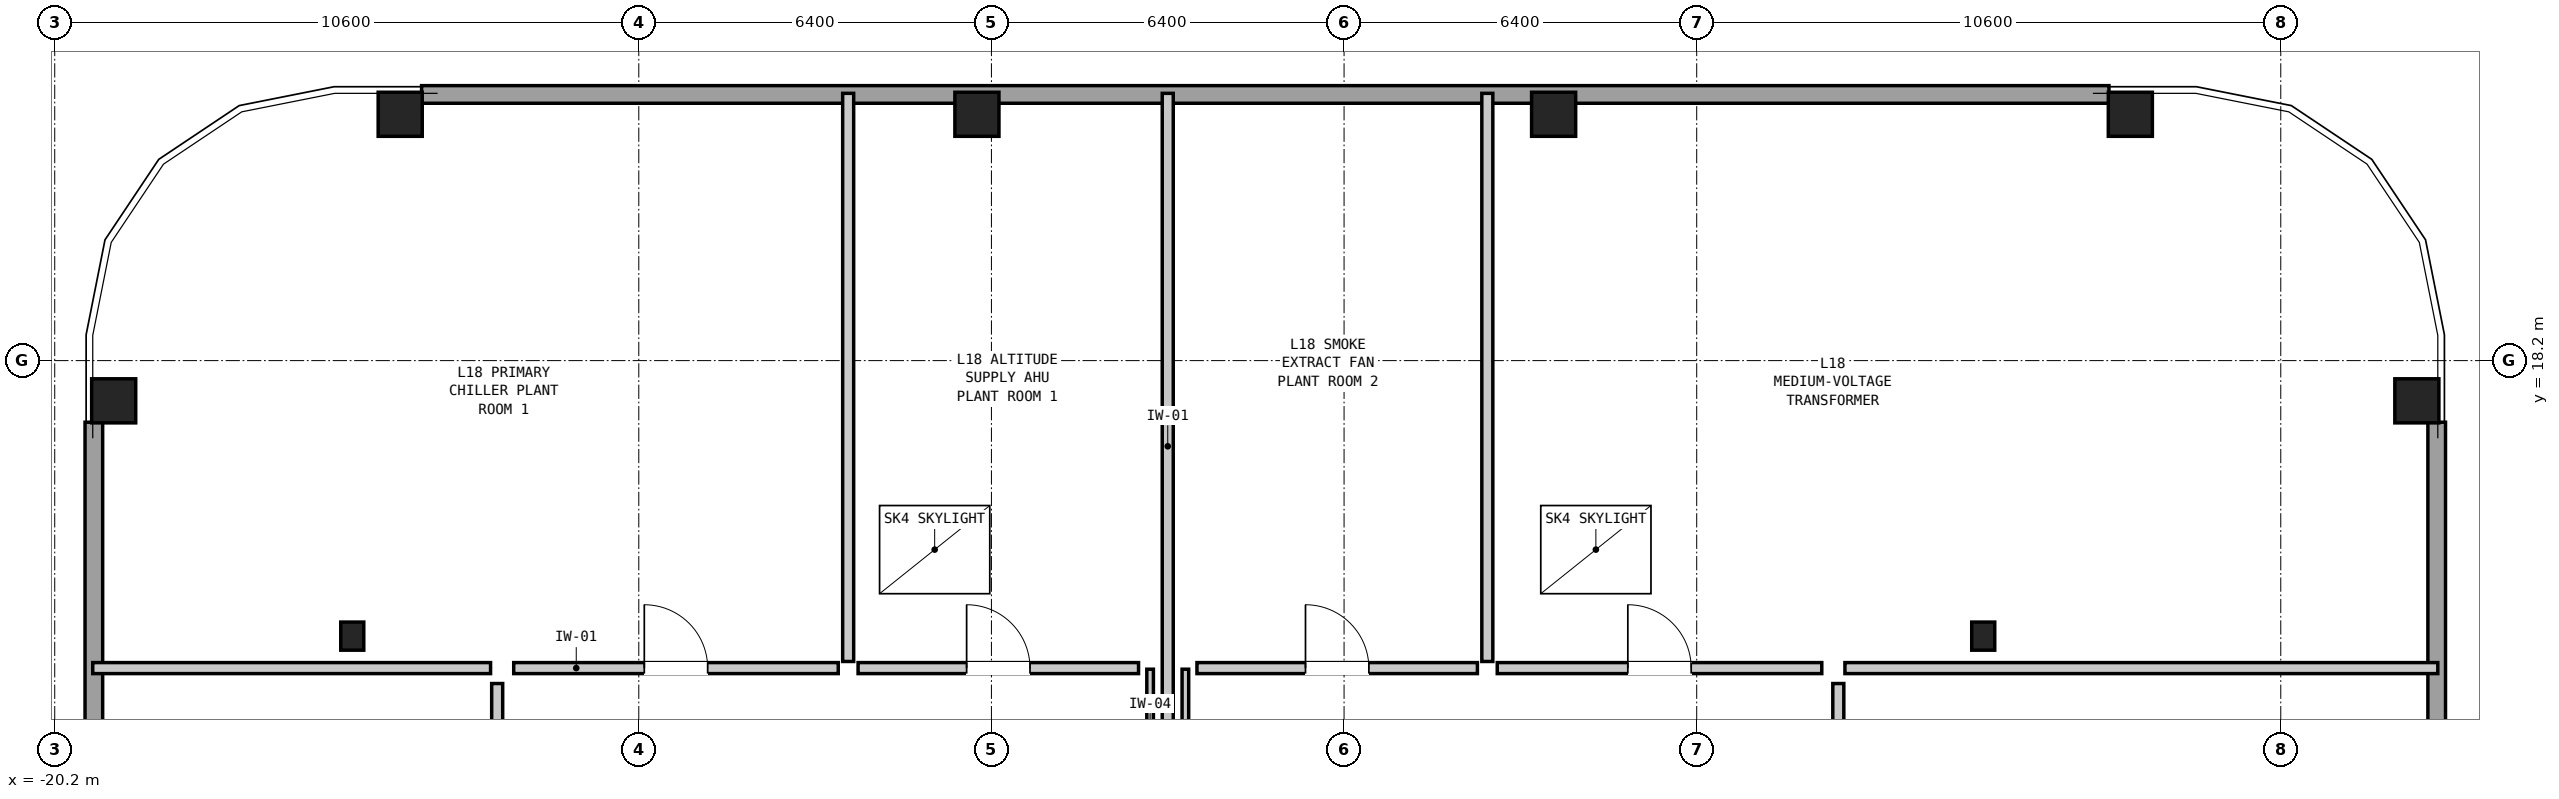
"""IFC4 building model, lengths in metres.
Left out: names, types, materials, properties, quantities, classifications, styles, units other than length and angle.
Written with IfcOpenShell. Run it as: python <this file> out.ifc"""

import sys

from ifc_helpers import new_model, si_unit, direction, frame, frame_2d, origin, origin_2d, place, context, subcontext, project, spatial, rectangle, hollow_rectangle, i_section, extrude, element, fill, save


model = new_model("IFC4")
c1 = context("Model", 3, precision=1e-05, world=origin(), true_north=direction((0.0, 1.0)))
c2 = subcontext(c1, "Body", "Model", "MODEL_VIEW")
j1 = project(units=[si_unit("LENGTHUNIT", "METRE"), si_unit("PLANEANGLEUNIT", "RADIAN")], contexts=[c1])
p1 = place(None, origin())
s1 = spatial("IfcSite", under=j1, at=p1, CompositionType="ELEMENT")
p2 = place(p1, origin())
s2 = spatial("IfcBuilding", under=s1, at=p2, CompositionType="ELEMENT")
p3 = place(p2, frame((0.0, 0.0, 65.1)))
s3 = spatial("IfcBuildingStorey", under=s2, at=p3, CompositionType="ELEMENT", Elevation=65.1)
for number, where, z_axis, x_axis in (
    (1, (22.67, 17.47, 0.0), (0.0, 0.0, 1.0), (0.0, 1.0, 0.0)),
    (2, (17.47, 22.67, 0.0), (0.0, 0.0, 1.0), (1.0, 0.0, 0.0)),
    (3, (7.003, 22.67, 0.0), (0.0, 0.0, 1.0), (1.0, 0.0, 0.0)),
    (4, (-3.463, 22.67, 0.0), (0.0, 0.0, 1.0), (1.0, 0.0, 0.0)),
    (5, (-13.93, 22.67, 0.0), (0.0, 0.0, 1.0), (1.0, 0.0, 0.0)),
    (6, (-19.13, 17.47, 0.0), (0.0, 0.0, 1.0), (0.0, 1.0, 0.0)),
):
    element("IfcColumn", number, at=place(p3, frame(where, z_axis=z_axis, x_axis=x_axis)), inside=s3, PredefinedType="COLUMN", context=c2, shape_type="SweptSolid", body=[
        extrude(hollow_rectangle(XDim=0.8, YDim=0.8, WallThickness=0.05, at=origin_2d()), origin(), (0.0, 0.0, 1.0), 4.35),
    ])
for number, where, z_axis, x_axis in (
    (7, (-14.8, 13.2, 0.0), (0.0, 0.0, 1.0), (1.0, 0.0, 0.0)),
    (8, (14.8, 13.2, 0.0), (0.0, 0.0, 1.0), (1.0, 0.0, 0.0)),
):
    element("IfcColumn", number, at=place(p3, frame(where, z_axis=z_axis, x_axis=x_axis)), inside=s3, PredefinedType="COLUMN", context=c2, shape_type="SweptSolid", body=[
        extrude(i_section(OverallWidth=0.418, OverallDepth=0.51, WebThickness=0.042, FlangeThickness=0.068, at=origin_2d()), origin(), (0.0, 0.0, 1.0), 4.35),
    ])
for number, where, z_axis, x_axis in (
    (9, (23.03, 17.082, 0.0), (0.0, 0.0, 1.0), (0.0, -1.0, 0.0)),
    (10, (-13.542, 23.03, 0.0), (0.0, 0.0, 1.0), (1.0, 0.0, 0.0)),
    (11, (-19.49, -13.542, 0.0), (0.0, 0.0, 1.0), (0.0, 1.0, 0.0)),
):
    element("IfcWall", number, at=place(p3, frame(where, z_axis=z_axis, x_axis=x_axis)), inside=s3, PredefinedType="SOLIDWALL", context=c2, shape_type="SweptSolid", body=[
        extrude(rectangle(XDim=30.624, YDim=0.32, at=frame_2d((15.312, 0.0))), origin(), (0.0, 0.0, 1.0), 2.31),
    ])
p4 = place(p3, frame((0.0, 10.24, 0.0), z_axis=(0.0, 0.0, 1.0), x_axis=(0.0, 1.0, 0.0)))
e12 = element("IfcWall", 12, at=p4, inside=s3, PredefinedType="PARTITIONING", context=c2, shape_type="SweptSolid", body=[
    extrude(rectangle(XDim=12.81, YDim=0.2, at=frame_2d((6.405, 0.0))), origin(), (0.0, 0.0, 1.0), 2.31),
])
for number, where, z_axis, x_axis in (
    (13, (-0.32, 10.24, 0.0), (0.0, 0.0, 1.0), (0.0, 1.0, 0.0)),
    (14, (0.32, 10.24, 0.0), (0.0, 0.0, 1.0), (0.0, 1.0, 0.0)),
):
    element("IfcWall", number, at=place(p3, frame(where, z_axis=z_axis, x_axis=x_axis)), inside=s3, PredefinedType="PARTITIONING", context=c2, shape_type="SweptSolid", body=[
        extrude(rectangle(XDim=2.36, YDim=0.12, at=frame_2d((1.18, 0.0))), origin(), (0.0, 0.0, 1.0), 2.31),
    ])
p5 = place(p3, frame((-11.87, 12.62, 0.0), z_axis=(0.0, 0.0, 1.0), x_axis=(1.0, 0.0, 0.0)))
e15 = element("IfcWall", 15, at=p5, inside=s3, PredefinedType="PARTITIONING", context=c2, shape_type="SweptSolid", body=[
    extrude(rectangle(XDim=5.89, YDim=0.2, at=frame_2d((2.945, 0.0))), origin(), (0.0, 0.0, 1.0), 4.13),
])
p6 = place(p5, frame((2.37, 0.0, 0.0)))
e16 = element("IfcOpeningElement", 16, at=p6, cuts=e15, PredefinedType="OPENING", context=c2, shape_type="SweptSolid", body=[
    extrude(rectangle(XDim=1.15, YDim=2.1, at=frame_2d((0.575, 1.05))), frame((0.0, 0.112, 0.0), z_axis=(0.0, -1.0, 0.0), x_axis=(1.0, 0.0, 0.0)), (0.0, 0.0, 1.0), 0.224),
])
p7 = place(p3, frame((-5.8, 12.74, 0.0), z_axis=(0.0, 0.0, 1.0), x_axis=(0.0, 1.0, 0.0)))
e17 = element("IfcWall", 17, at=p7, inside=s3, PredefinedType="PARTITIONING", context=c2, shape_type="SweptSolid", body=[
    extrude(rectangle(XDim=10.31, YDim=0.2, at=frame_2d((5.155, 0.0))), origin(), (0.0, 0.0, 1.0), 3.574),
])
p8 = place(p3, frame((-5.62, 12.62, 0.0), z_axis=(0.0, 0.0, 1.0), x_axis=(1.0, 0.0, 0.0)))
e18 = element("IfcWall", 18, at=p8, inside=s3, PredefinedType="PARTITIONING", context=c2, shape_type="SweptSolid", body=[
    extrude(rectangle(XDim=5.09, YDim=0.2, at=frame_2d((2.545, 0.0))), origin(), (0.0, 0.0, 1.0), 4.13),
])
p9 = place(p8, frame((1.97, 0.0, 0.0)))
e19 = element("IfcOpeningElement", 19, at=p9, cuts=e18, PredefinedType="OPENING", context=c2, shape_type="SweptSolid", body=[
    extrude(rectangle(XDim=1.15, YDim=2.1, at=frame_2d((0.575, 1.05))), frame((0.0, 0.112, 0.0), z_axis=(0.0, -1.0, 0.0), x_axis=(1.0, 0.0, 0.0)), (0.0, 0.0, 1.0), 0.224),
])
p10 = place(p3, frame((0.53, 12.62, 0.0), z_axis=(0.0, 0.0, 1.0), x_axis=(1.0, 0.0, 0.0)))
e20 = element("IfcWall", 20, at=p10, inside=s3, PredefinedType="PARTITIONING", context=c2, shape_type="SweptSolid", body=[
    extrude(rectangle(XDim=5.09, YDim=0.2, at=frame_2d((2.545, 0.0))), origin(), (0.0, 0.0, 1.0), 4.13),
])
p11 = place(p10, frame((1.97, 0.0, 0.0)))
e21 = element("IfcOpeningElement", 21, at=p11, cuts=e20, PredefinedType="OPENING", context=c2, shape_type="SweptSolid", body=[
    extrude(rectangle(XDim=1.15, YDim=2.1, at=frame_2d((0.575, 1.05))), frame((0.0, 0.112, 0.0), z_axis=(0.0, -1.0, 0.0), x_axis=(1.0, 0.0, 0.0)), (0.0, 0.0, 1.0), 0.224),
])
p12 = place(p3, frame((5.8, 12.74, 0.0), z_axis=(0.0, 0.0, 1.0), x_axis=(0.0, 1.0, 0.0)))
e22 = element("IfcWall", 22, at=p12, inside=s3, PredefinedType="PARTITIONING", context=c2, shape_type="SweptSolid", body=[
    extrude(rectangle(XDim=10.31, YDim=0.2, at=frame_2d((5.155, 0.0))), origin(), (0.0, 0.0, 1.0), 4.13),
])
p13 = place(p3, frame((5.98, 12.62, 0.0), z_axis=(0.0, 0.0, 1.0), x_axis=(1.0, 0.0, 0.0)))
e23 = element("IfcWall", 23, at=p13, inside=s3, PredefinedType="PARTITIONING", context=c2, shape_type="SweptSolid", body=[
    extrude(rectangle(XDim=5.89, YDim=0.2, at=frame_2d((2.945, 0.0))), origin(), (0.0, 0.0, 1.0), 4.13),
])
p14 = place(p13, frame((2.37, 0.0, 0.0)))
e24 = element("IfcOpeningElement", 24, at=p14, cuts=e23, PredefinedType="OPENING", context=c2, shape_type="SweptSolid", body=[
    extrude(rectangle(XDim=1.15, YDim=2.1, at=frame_2d((0.575, 1.05))), frame((0.0, 0.112, 0.0), z_axis=(0.0, -1.0, 0.0), x_axis=(1.0, 0.0, 0.0)), (0.0, 0.0, 1.0), 0.224),
])
p15 = place(p3, frame((-19.51, 12.62, 0.0), z_axis=(0.0, 0.0, 1.0), x_axis=(1.0, 0.0, 0.0)))
e25 = element("IfcWall", 25, at=p15, inside=s3, PredefinedType="PARTITIONING", context=c2, shape_type="SweptSolid", body=[
    extrude(rectangle(XDim=7.22, YDim=0.2, at=frame_2d((3.61, 0.0))), origin(), (0.0, 0.0, 1.0), 4.13),
])
p16 = place(p3, frame((12.29, 12.62, 0.0), z_axis=(0.0, 0.0, 1.0), x_axis=(1.0, 0.0, 0.0)))
e26 = element("IfcWall", 26, at=p16, inside=s3, PredefinedType="PARTITIONING", context=c2, shape_type="SweptSolid", body=[
    extrude(rectangle(XDim=10.76, YDim=0.2, at=frame_2d((5.38, 0.0))), origin(), (0.0, 0.0, 1.0), 4.13),
])
p17 = place(p3, frame((-12.17, 0.81, 0.0), z_axis=(0.0, 0.0, 1.0), x_axis=(0.0, 1.0, 0.0)))
e27 = element("IfcWall", 27, at=p17, inside=s3, PredefinedType="PARTITIONING", context=c2, shape_type="SweptSolid", body=[
    extrude(rectangle(XDim=11.53, YDim=0.2, at=frame_2d((5.765, 0.0))), origin(), (0.0, 0.0, 1.0), 4.13),
])
p18 = place(p17, frame((5.19, 0.0, 0.0)))
e28 = element("IfcOpeningElement", 28, at=p18, cuts=e27, PredefinedType="OPENING", context=c2, shape_type="SweptSolid", body=[
    extrude(rectangle(XDim=1.15, YDim=2.1, at=frame_2d((0.575, 1.05))), frame((0.0, 0.112, 0.0), z_axis=(0.0, -1.0, 0.0), x_axis=(1.0, 0.0, 0.0)), (0.0, 0.0, 1.0), 0.224),
])
p19 = place(p3, frame((12.17, 0.81, 0.0), z_axis=(0.0, 0.0, 1.0), x_axis=(0.0, 1.0, 0.0)))
e29 = element("IfcWall", 29, at=p19, inside=s3, PredefinedType="PARTITIONING", context=c2, shape_type="SweptSolid", body=[
    extrude(rectangle(XDim=11.53, YDim=0.2, at=frame_2d((5.765, 0.0))), origin(), (0.0, 0.0, 1.0), 4.13),
])
p20 = place(p19, frame((6.574, 0.0, 0.0)))
e30 = element("IfcOpeningElement", 30, at=p20, cuts=e29, PredefinedType="OPENING", context=c2, shape_type="SweptSolid", body=[
    extrude(rectangle(XDim=1.15, YDim=2.1, at=frame_2d((0.575, 1.05))), frame((0.0, 0.112, 0.0), z_axis=(0.0, -1.0, 0.0), x_axis=(1.0, 0.0, 0.0)), (0.0, 0.0, 1.0), 0.224),
])
p21 = place(p3, frame((0.0, 0.0, -0.38)))
p22 = place(p21, frame((-4.23, 14.77, 0.0), z_axis=(0.0, 0.0, 1.0), x_axis=(1.0, 0.0, 0.0)))
p23 = place(p22, frame((0.0, 0.0, 0.33)))
e31 = element("IfcWindow", 31, at=p23, inside=s3, PartitioningType="SINGLE_PANEL", PredefinedType="SKYLIGHT", context=c2, shape_type="SweptSolid", body=[
    extrude(rectangle(XDim=2.0, YDim=1.6, at=origin_2d()), origin(), (0.0, 0.0, 1.0), 0.05),
])
p24 = place(p21, frame((7.77, 14.77, 0.0), z_axis=(0.0, 0.0, 1.0), x_axis=(1.0, 0.0, 0.0)))
p25 = place(p24, frame((0.0, 0.0, 0.33)))
e32 = element("IfcWindow", 32, at=p25, inside=s3, PartitioningType="SINGLE_PANEL", PredefinedType="SKYLIGHT", context=c2, shape_type="SweptSolid", body=[
    extrude(rectangle(XDim=2.0, YDim=1.6, at=origin_2d()), origin(), (0.0, 0.0, 1.0), 0.05),
])
p26 = place(p6, origin())
e33 = element("IfcDoor", 33, at=p26, inside=s3, OperationType="SINGLE_SWING_LEFT", PredefinedType="DOOR", context=c2, shape_type="SweptSolid", body=[
    extrude(rectangle(XDim=1.15, YDim=2.1, at=frame_2d((0.575, 1.05))), frame((0.0, 0.025, 0.0), z_axis=(0.0, -1.0, 0.0), x_axis=(1.0, 0.0, 0.0)), (0.0, 0.0, 1.0), 0.05),
])
fill(e16, e33)
p27 = place(p9, origin())
e34 = element("IfcDoor", 34, at=p27, inside=s3, OperationType="SINGLE_SWING_LEFT", PredefinedType="DOOR", context=c2, shape_type="SweptSolid", body=[
    extrude(rectangle(XDim=1.15, YDim=2.1, at=frame_2d((0.575, 1.05))), frame((0.0, 0.025, 0.0), z_axis=(0.0, -1.0, 0.0), x_axis=(1.0, 0.0, 0.0)), (0.0, 0.0, 1.0), 0.05),
])
fill(e19, e34)
p28 = place(p11, origin())
e35 = element("IfcDoor", 35, at=p28, inside=s3, OperationType="SINGLE_SWING_LEFT", PredefinedType="DOOR", context=c2, shape_type="SweptSolid", body=[
    extrude(rectangle(XDim=1.15, YDim=2.1, at=frame_2d((0.575, 1.05))), frame((0.0, 0.025, 0.0), z_axis=(0.0, -1.0, 0.0), x_axis=(1.0, 0.0, 0.0)), (0.0, 0.0, 1.0), 0.05),
])
fill(e21, e35)
p29 = place(p14, origin())
e36 = element("IfcDoor", 36, at=p29, inside=s3, OperationType="SINGLE_SWING_LEFT", PredefinedType="DOOR", context=c2, shape_type="SweptSolid", body=[
    extrude(rectangle(XDim=1.15, YDim=2.1, at=frame_2d((0.575, 1.05))), frame((0.0, 0.025, 0.0), z_axis=(0.0, -1.0, 0.0), x_axis=(1.0, 0.0, 0.0)), (0.0, 0.0, 1.0), 0.05),
])
fill(e24, e36)
save(model, sys.argv[1])
